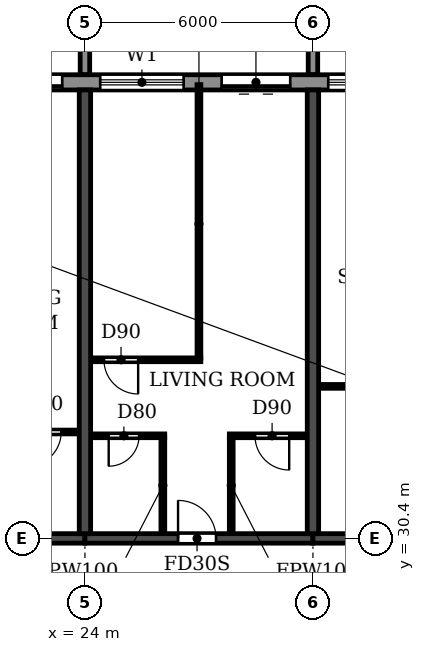
"""IFC4 building model, lengths in metres.
Left out: names, types, materials, properties, quantities, classifications, styles, units other than length and angle.
Written with IfcOpenShell. Run it as: python <this file> out.ifc"""

import sys

from ifc_helpers import new_model, si_unit, direction, frame, frame_2d, origin, place, context, subcontext, project, spatial, polyline, rectangle, outline, extrude, source, transform, mapped, element, fill, save


model = new_model("IFC4")
c1 = context("Model", 3, precision=1e-05, world=origin(), true_north=direction((0.0, 1.0)))
c2 = subcontext(c1, "Body", "Model", "MODEL_VIEW")
j1 = project(units=[si_unit("LENGTHUNIT", "METRE"), si_unit("PLANEANGLEUNIT", "RADIAN")], contexts=[c1])
p1 = place(None, origin())
s1 = spatial("IfcSite", under=j1, at=p1, CompositionType="ELEMENT")
p2 = place(p1, origin())
s2 = spatial("IfcBuilding", under=s1, at=p2, CompositionType="ELEMENT")
p3 = place(p2, frame((0.0, 0.0, 125.7)))
s3 = spatial("IfcBuildingStorey", under=s2, at=p3, CompositionType="ELEMENT", Elevation=125.7)
for number, where, z_axis, x_axis in (
    (1, (24.0, 30.525, 0.0), (0.0, 0.0, 1.0), (0.0, 1.0, 0.0)),
    (2, (30.0, 30.525, 0.0), (0.0, 0.0, 1.0), (0.0, 1.0, 0.0)),
):
    element("IfcWall", number, at=place(p3, frame(where, z_axis=z_axis, x_axis=x_axis)), inside=s3, PredefinedType="SHEAR", context=c2, shape_type="SweptSolid", body=[
        extrude(rectangle(XDim=11.675, YDim=0.3, at=frame_2d((5.837, 0.0))), origin(), (0.0, 0.0, 1.0), 3.07),
    ])
p4 = place(p3, frame((18.0, 30.4, 0.0), z_axis=(0.0, 0.0, 1.0), x_axis=(1.0, 0.0, 0.0)))
e3 = element("IfcWall", 3, at=p4, inside=s3, PredefinedType="SHEAR", context=c2, shape_type="SweptSolid", body=[
    extrude(rectangle(XDim=6.0, YDim=0.25, at=frame_2d((3.0, 0.0))), origin(), (0.0, 0.0, 1.0), 2.47),
])
p5 = place(p4, frame((2.45, 0.0, 0.0)))
e4 = element("IfcOpeningElement", 4, at=p5, cuts=e3, PredefinedType="OPENING", context=c2, shape_type="SweptSolid", body=[
    extrude(rectangle(XDim=1.0, YDim=2.1, at=frame_2d((0.5, 1.05))), frame((0.0, 0.135, 0.0), z_axis=(0.0, -1.0, 0.0), x_axis=(1.0, 0.0, 0.0)), (0.0, 0.0, 1.0), 0.27),
])
p6 = place(p3, frame((24.0, 30.4, 0.0), z_axis=(0.0, 0.0, 1.0), x_axis=(1.0, 0.0, 0.0)))
e5 = element("IfcWall", 5, at=p6, inside=s3, PredefinedType="SHEAR", context=c2, shape_type="SweptSolid", body=[
    extrude(rectangle(XDim=6.0, YDim=0.25, at=frame_2d((3.0, 0.0))), origin(), (0.0, 0.0, 1.0), 2.47),
])
p7 = place(p6, frame((2.45, 0.0, 0.0)))
e6 = element("IfcOpeningElement", 6, at=p7, cuts=e5, PredefinedType="OPENING", context=c2, shape_type="SweptSolid", body=[
    extrude(rectangle(XDim=1.0, YDim=2.1, at=frame_2d((0.5, 1.05))), frame((0.0, 0.135, 0.0), z_axis=(0.0, -1.0, 0.0), x_axis=(1.0, 0.0, 0.0)), (0.0, 0.0, 1.0), 0.27),
])
p8 = place(p3, frame((30.0, 30.4, 0.0), z_axis=(0.0, 0.0, 1.0), x_axis=(1.0, 0.0, 0.0)))
e7 = element("IfcWall", 7, at=p8, inside=s3, PredefinedType="SHEAR", context=c2, shape_type="SweptSolid", body=[
    extrude(rectangle(XDim=6.0, YDim=0.25, at=frame_2d((3.0, 0.0))), origin(), (0.0, 0.0, 1.0), 2.47),
])
p9 = place(p8, frame((2.45, 0.0, 0.0)))
e8 = element("IfcOpeningElement", 8, at=p9, cuts=e7, PredefinedType="OPENING", context=c2, shape_type="SweptSolid", body=[
    extrude(rectangle(XDim=1.0, YDim=2.1, at=frame_2d((0.5, 1.05))), frame((0.0, 0.135, 0.0), z_axis=(0.0, -1.0, 0.0), x_axis=(1.0, 0.0, 0.0)), (0.0, 0.0, 1.0), 0.27),
])
p10 = place(p3, frame((85.317, 42.4, 0.0), z_axis=(0.0, 0.0, 1.0), x_axis=(-1.0, 0.0, 0.0)))
e9 = element("IfcWall", 9, at=p10, inside=s3, PredefinedType="STANDARD", context=c2, shape_type="SweptSolid", body=[
    extrude(rectangle(XDim=68.634, YDim=0.4, at=frame_2d((34.317, 0.0))), origin(), (0.0, 0.0, 1.0), 3.07),
])
p11 = place(p10, frame((64.717, 0.0, 0.9)))
e10 = element("IfcOpeningElement", 10, at=p11, cuts=e9, PredefinedType="OPENING", context=c2, shape_type="SweptSolid", body=[
    extrude(rectangle(XDim=2.2, YDim=1.5, at=frame_2d((1.1, 0.75))), frame((0.0, 0.21, 0.0), z_axis=(0.0, -1.0, 0.0), x_axis=(1.0, 0.0, 0.0)), (0.0, 0.0, 1.0), 0.42),
])
p12 = place(p10, frame((61.917, 0.0, 0.0)))
e11 = element("IfcOpeningElement", 11, at=p12, cuts=e9, PredefinedType="OPENING", context=c2, shape_type="SweptSolid", body=[
    extrude(rectangle(XDim=1.8, YDim=2.4, at=frame_2d((0.9, 1.2))), frame((0.0, 0.21, 0.0), z_axis=(0.0, -1.0, 0.0), x_axis=(1.0, 0.0, 0.0)), (0.0, 0.0, 1.0), 0.42),
])
p13 = place(p10, frame((58.717, 0.0, 0.9)))
e12 = element("IfcOpeningElement", 12, at=p13, cuts=e9, PredefinedType="OPENING", context=c2, shape_type="SweptSolid", body=[
    extrude(rectangle(XDim=2.2, YDim=1.5, at=frame_2d((1.1, 0.75))), frame((0.0, 0.21, 0.0), z_axis=(0.0, -1.0, 0.0), x_axis=(1.0, 0.0, 0.0)), (0.0, 0.0, 1.0), 0.42),
])
p14 = place(p10, frame((55.917, 0.0, 0.0)))
e13 = element("IfcOpeningElement", 13, at=p14, cuts=e9, PredefinedType="OPENING", context=c2, shape_type="SweptSolid", body=[
    extrude(rectangle(XDim=1.8, YDim=2.4, at=frame_2d((0.9, 1.2))), frame((0.0, 0.21, 0.0), z_axis=(0.0, -1.0, 0.0), x_axis=(1.0, 0.0, 0.0)), (0.0, 0.0, 1.0), 0.42),
])
p15 = place(p10, frame((52.717, 0.0, 0.9)))
e14 = element("IfcOpeningElement", 14, at=p15, cuts=e9, PredefinedType="OPENING", context=c2, shape_type="SweptSolid", body=[
    extrude(rectangle(XDim=2.2, YDim=1.5, at=frame_2d((1.1, 0.75))), frame((0.0, 0.21, 0.0), z_axis=(0.0, -1.0, 0.0), x_axis=(1.0, 0.0, 0.0)), (0.0, 0.0, 1.0), 0.42),
])
p16 = place(p10, frame((49.917, 0.0, 0.0)))
e15 = element("IfcOpeningElement", 15, at=p16, cuts=e9, PredefinedType="OPENING", context=c2, shape_type="SweptSolid", body=[
    extrude(rectangle(XDim=1.8, YDim=2.4, at=frame_2d((0.9, 1.2))), frame((0.0, 0.21, 0.0), z_axis=(0.0, -1.0, 0.0), x_axis=(1.0, 0.0, 0.0)), (0.0, 0.0, 1.0), 0.42),
])
p17 = place(p10, frame((46.717, 0.0, 0.9)))
e16 = element("IfcOpeningElement", 16, at=p17, cuts=e9, PredefinedType="OPENING", context=c2, shape_type="SweptSolid", body=[
    extrude(rectangle(XDim=2.2, YDim=1.5, at=frame_2d((1.1, 0.75))), frame((0.0, 0.21, 0.0), z_axis=(0.0, -1.0, 0.0), x_axis=(1.0, 0.0, 0.0)), (0.0, 0.0, 1.0), 0.42),
])
p18 = place(p10, frame((43.917, 0.0, 0.0)))
e17 = element("IfcOpeningElement", 17, at=p18, cuts=e9, PredefinedType="OPENING", context=c2, shape_type="SweptSolid", body=[
    extrude(rectangle(XDim=1.8, YDim=2.4, at=frame_2d((0.9, 1.2))), frame((0.0, 0.21, 0.0), z_axis=(0.0, -1.0, 0.0), x_axis=(1.0, 0.0, 0.0)), (0.0, 0.0, 1.0), 0.42),
])
p19 = place(p10, frame((40.717, 0.0, 0.9)))
e18 = element("IfcOpeningElement", 18, at=p19, cuts=e9, PredefinedType="OPENING", context=c2, shape_type="SweptSolid", body=[
    extrude(rectangle(XDim=2.2, YDim=1.5, at=frame_2d((1.1, 0.75))), frame((0.0, 0.21, 0.0), z_axis=(0.0, -1.0, 0.0), x_axis=(1.0, 0.0, 0.0)), (0.0, 0.0, 1.0), 0.42),
])
p20 = place(p10, frame((37.717, 0.0, 0.9)))
e19 = element("IfcOpeningElement", 19, at=p20, cuts=e9, PredefinedType="OPENING", context=c2, shape_type="SweptSolid", body=[
    extrude(rectangle(XDim=2.2, YDim=1.5, at=frame_2d((1.1, 0.75))), frame((0.0, 0.21, 0.0), z_axis=(0.0, -1.0, 0.0), x_axis=(1.0, 0.0, 0.0)), (0.0, 0.0, 1.0), 0.42),
])
p21 = place(p10, frame((34.917, 0.0, 0.0)))
e20 = element("IfcOpeningElement", 20, at=p21, cuts=e9, PredefinedType="OPENING", context=c2, shape_type="SweptSolid", body=[
    extrude(rectangle(XDim=1.8, YDim=2.4, at=frame_2d((0.9, 1.2))), frame((0.0, 0.21, 0.0), z_axis=(0.0, -1.0, 0.0), x_axis=(1.0, 0.0, 0.0)), (0.0, 0.0, 1.0), 0.42),
])
p22 = place(p10, frame((31.717, 0.0, 0.9)))
e21 = element("IfcOpeningElement", 21, at=p22, cuts=e9, PredefinedType="OPENING", context=c2, shape_type="SweptSolid", body=[
    extrude(rectangle(XDim=2.2, YDim=1.5, at=frame_2d((1.1, 0.75))), frame((0.0, 0.21, 0.0), z_axis=(0.0, -1.0, 0.0), x_axis=(1.0, 0.0, 0.0)), (0.0, 0.0, 1.0), 0.42),
])
p23 = place(p10, frame((28.717, 0.0, 0.9)))
e22 = element("IfcOpeningElement", 22, at=p23, cuts=e9, PredefinedType="OPENING", context=c2, shape_type="SweptSolid", body=[
    extrude(rectangle(XDim=2.2, YDim=1.5, at=frame_2d((1.1, 0.75))), frame((0.0, 0.21, 0.0), z_axis=(0.0, -1.0, 0.0), x_axis=(1.0, 0.0, 0.0)), (0.0, 0.0, 1.0), 0.42),
])
p24 = place(p10, frame((25.717, 0.0, 0.9)))
e23 = element("IfcOpeningElement", 23, at=p24, cuts=e9, PredefinedType="OPENING", context=c2, shape_type="SweptSolid", body=[
    extrude(rectangle(XDim=2.2, YDim=1.5, at=frame_2d((1.1, 0.75))), frame((0.0, 0.21, 0.0), z_axis=(0.0, -1.0, 0.0), x_axis=(1.0, 0.0, 0.0)), (0.0, 0.0, 1.0), 0.42),
])
p25 = place(p10, frame((22.717, 0.0, 0.9)))
e24 = element("IfcOpeningElement", 24, at=p25, cuts=e9, PredefinedType="OPENING", context=c2, shape_type="SweptSolid", body=[
    extrude(rectangle(XDim=2.2, YDim=1.5, at=frame_2d((1.1, 0.75))), frame((0.0, 0.21, 0.0), z_axis=(0.0, -1.0, 0.0), x_axis=(1.0, 0.0, 0.0)), (0.0, 0.0, 1.0), 0.42),
])
p26 = place(p10, frame((19.917, 0.0, 0.0)))
e25 = element("IfcOpeningElement", 25, at=p26, cuts=e9, PredefinedType="OPENING", context=c2, shape_type="SweptSolid", body=[
    extrude(rectangle(XDim=1.8, YDim=2.4, at=frame_2d((0.9, 1.2))), frame((0.0, 0.21, 0.0), z_axis=(0.0, -1.0, 0.0), x_axis=(1.0, 0.0, 0.0)), (0.0, 0.0, 1.0), 0.42),
])
p27 = place(p10, frame((16.917, 0.0, 0.0)))
e26 = element("IfcOpeningElement", 26, at=p27, cuts=e9, PredefinedType="OPENING", context=c2, shape_type="SweptSolid", body=[
    extrude(rectangle(XDim=1.8, YDim=2.4, at=frame_2d((0.9, 1.2))), frame((0.0, 0.21, 0.0), z_axis=(0.0, -1.0, 0.0), x_axis=(1.0, 0.0, 0.0)), (0.0, 0.0, 1.0), 0.42),
])
p28 = place(p10, frame((13.717, 0.0, 0.9)))
e27 = element("IfcOpeningElement", 27, at=p28, cuts=e9, PredefinedType="OPENING", context=c2, shape_type="SweptSolid", body=[
    extrude(rectangle(XDim=2.2, YDim=1.5, at=frame_2d((1.1, 0.75))), frame((0.0, 0.21, 0.0), z_axis=(0.0, -1.0, 0.0), x_axis=(1.0, 0.0, 0.0)), (0.0, 0.0, 1.0), 0.42),
])
p29 = place(p10, frame((10.717, 0.0, 0.9)))
e28 = element("IfcOpeningElement", 28, at=p29, cuts=e9, PredefinedType="OPENING", context=c2, shape_type="SweptSolid", body=[
    extrude(rectangle(XDim=2.2, YDim=1.5, at=frame_2d((1.1, 0.75))), frame((0.0, 0.21, 0.0), z_axis=(0.0, -1.0, 0.0), x_axis=(1.0, 0.0, 0.0)), (0.0, 0.0, 1.0), 0.42),
])
p30 = place(p10, frame((7.717, 0.0, 0.9)))
e29 = element("IfcOpeningElement", 29, at=p30, cuts=e9, PredefinedType="OPENING", context=c2, shape_type="SweptSolid", body=[
    extrude(rectangle(XDim=2.2, YDim=1.5, at=frame_2d((1.1, 0.75))), frame((0.0, 0.21, 0.0), z_axis=(0.0, -1.0, 0.0), x_axis=(1.0, 0.0, 0.0)), (0.0, 0.0, 1.0), 0.42),
])
p31 = place(p10, frame((4.917, 0.0, 0.0)))
e30 = element("IfcOpeningElement", 30, at=p31, cuts=e9, PredefinedType="OPENING", context=c2, shape_type="SweptSolid", body=[
    extrude(rectangle(XDim=1.8, YDim=2.4, at=frame_2d((0.9, 1.2))), frame((0.0, 0.21, 0.0), z_axis=(0.0, -1.0, 0.0), x_axis=(1.0, 0.0, 0.0)), (0.0, 0.0, 1.0), 0.42),
])
p32 = place(p10, frame((1.717, 0.0, 0.9)))
e31 = element("IfcOpeningElement", 31, at=p32, cuts=e9, PredefinedType="OPENING", context=c2, shape_type="SweptSolid", body=[
    extrude(rectangle(XDim=2.2, YDim=1.5, at=frame_2d((1.1, 0.75))), frame((0.0, 0.21, 0.0), z_axis=(0.0, -1.0, 0.0), x_axis=(1.0, 0.0, 0.0)), (0.0, 0.0, 1.0), 0.42),
])
m1 = source(origin(), c2, "Body", "SweptSolid", [
    extrude(outline(polyline([(0.0, 0.0), (0.25, 0.0), (0.25, 3.1), (0.0, 3.1), (0.0, 0.0)])), origin(), (0.0, 0.0, 1.0), 3.1),
])
for number, where in (
    (32, (23.875, 42.6, 0.0)),
    (33, (29.875, 42.6, 0.0)),
):
    element("IfcWall", number, at=place(p3, frame(where)), inside=s3, PredefinedType="STANDARD", context=c2, shape_type="MappedRepresentation", body=[
        mapped(m1, transform((0.0, 0.0, 0.0))),
    ])
p33 = place(p3, frame((24.16, 33.1, 0.0), z_axis=(0.0, 0.0, 1.0), x_axis=(1.0, 0.0, 0.0)))
e34 = element("IfcWall", 34, at=p33, inside=s3, PredefinedType="PARTITIONING", context=c2, shape_type="SweptSolid", body=[
    extrude(rectangle(XDim=1.94, YDim=0.1, at=frame_2d((0.97, 0.0))), origin(), (0.0, 0.0, 1.0), 3.07),
])
p34 = place(p33, frame((0.465, 0.0, 0.0)))
e35 = element("IfcOpeningElement", 35, at=p34, cuts=e34, PredefinedType="OPENING", context=c2, shape_type="SweptSolid", body=[
    extrude(rectangle(XDim=0.8, YDim=2.1, at=frame_2d((0.4, 1.05))), frame((0.0, 0.06, 0.0), z_axis=(0.0, -1.0, 0.0), x_axis=(1.0, 0.0, 0.0)), (0.0, 0.0, 1.0), 0.12),
])
p35 = place(p3, frame((27.8, 33.1, 0.0), z_axis=(0.0, 0.0, 1.0), x_axis=(1.0, 0.0, 0.0)))
e36 = element("IfcWall", 36, at=p35, inside=s3, PredefinedType="PARTITIONING", context=c2, shape_type="SweptSolid", body=[
    extrude(rectangle(XDim=2.04, YDim=0.1, at=frame_2d((1.02, 0.0))), origin(), (0.0, 0.0, 1.0), 3.07),
])
p36 = place(p35, frame((0.675, 0.0, 0.0)))
e37 = element("IfcOpeningElement", 37, at=p36, cuts=e36, PredefinedType="OPENING", context=c2, shape_type="SweptSolid", body=[
    extrude(rectangle(XDim=0.9, YDim=2.1, at=frame_2d((0.45, 1.05))), frame((0.0, 0.06, 0.0), z_axis=(0.0, -1.0, 0.0), x_axis=(1.0, 0.0, 0.0)), (0.0, 0.0, 1.0), 0.12),
])
p37 = place(p3, frame((21.8, 33.2, 0.0), z_axis=(0.0, 0.0, 1.0), x_axis=(1.0, 0.0, 0.0)))
e38 = element("IfcWall", 38, at=p37, inside=s3, PredefinedType="PARTITIONING", context=c2, shape_type="SweptSolid", body=[
    extrude(rectangle(XDim=2.04, YDim=0.1, at=frame_2d((1.02, 0.0))), origin(), (0.0, 0.0, 1.0), 3.07),
])
p38 = place(p37, frame((0.675, 0.0, 0.0)))
e39 = element("IfcOpeningElement", 39, at=p38, cuts=e38, PredefinedType="OPENING", context=c2, shape_type="SweptSolid", body=[
    extrude(rectangle(XDim=0.9, YDim=2.1, at=frame_2d((0.45, 1.05))), frame((0.0, 0.06, 0.0), z_axis=(0.0, -1.0, 0.0), x_axis=(1.0, 0.0, 0.0)), (0.0, 0.0, 1.0), 0.12),
])
p39 = place(p3, frame((30.16, 34.4, 0.0), z_axis=(0.0, 0.0, 1.0), x_axis=(1.0, 0.0, 0.0)))
e40 = element("IfcWall", 40, at=p39, inside=s3, PredefinedType="PARTITIONING", context=c2, shape_type="SweptSolid", body=[
    extrude(rectangle(XDim=1.94, YDim=0.1, at=frame_2d((0.97, 0.0))), origin(), (0.0, 0.0, 1.0), 3.07),
])
p40 = place(p3, frame((24.16, 35.1, 0.0), z_axis=(0.0, 0.0, 1.0), x_axis=(1.0, 0.0, 0.0)))
e41 = element("IfcWall", 41, at=p40, inside=s3, PredefinedType="PARTITIONING", context=c2, shape_type="SweptSolid", body=[
    extrude(rectangle(XDim=2.89, YDim=0.1, at=frame_2d((1.445, 0.0))), origin(), (0.0, 0.0, 1.0), 3.07),
])
p41 = place(p40, frame((0.34, 0.0, 0.0)))
e42 = element("IfcOpeningElement", 42, at=p41, cuts=e41, PredefinedType="OPENING", context=c2, shape_type="SweptSolid", body=[
    extrude(rectangle(XDim=0.9, YDim=2.1, at=frame_2d((0.45, 1.05))), frame((0.0, 0.06, 0.0), z_axis=(0.0, -1.0, 0.0), x_axis=(1.0, 0.0, 0.0)), (0.0, 0.0, 1.0), 0.12),
])
p42 = place(p3, frame((26.05, 30.535, 0.0), z_axis=(0.0, 0.0, 1.0), x_axis=(0.0, 1.0, 0.0)))
e43 = element("IfcWall", 43, at=p42, inside=s3, PredefinedType="PARTITIONING", context=c2, shape_type="SweptSolid", body=[
    extrude(rectangle(XDim=2.515, YDim=0.1, at=frame_2d((1.258, 0.0))), origin(), (0.0, 0.0, 1.0), 3.07),
])
p43 = place(p3, frame((27.0, 35.15, 0.0), z_axis=(0.0, 0.0, 1.0), x_axis=(0.0, 1.0, 0.0)))
e44 = element("IfcWall", 44, at=p43, inside=s3, PredefinedType="PARTITIONING", context=c2, shape_type="SweptSolid", body=[
    extrude(rectangle(XDim=7.19, YDim=0.1, at=frame_2d((3.595, 0.0))), origin(), (0.0, 0.0, 1.0), 3.07),
])
p44 = place(p3, frame((27.85, 30.535, 0.0), z_axis=(0.0, 0.0, 1.0), x_axis=(0.0, 1.0, 0.0)))
e45 = element("IfcWall", 45, at=p44, inside=s3, PredefinedType="PARTITIONING", context=c2, shape_type="SweptSolid", body=[
    extrude(rectangle(XDim=2.515, YDim=0.1, at=frame_2d((1.258, 0.0))), origin(), (0.0, 0.0, 1.0), 3.07),
])
p45 = place(p12, origin())
e46 = element("IfcDoor", 46, at=p45, inside=s3, OperationType="DOUBLE_DOOR_SLIDING", PredefinedType="DOOR", context=c2, shape_type="SweptSolid", body=[
    extrude(rectangle(XDim=1.8, YDim=2.4, at=frame_2d((0.9, 1.2))), frame((0.0, 0.025, 0.0), z_axis=(0.0, -1.0, 0.0), x_axis=(1.0, 0.0, 0.0)), (0.0, 0.0, 1.0), 0.05),
])
fill(e11, e46)
p46 = place(p13, origin())
e47 = element("IfcWindow", 47, at=p46, inside=s3, PartitioningType="DOUBLE_PANEL_HORIZONTAL", PredefinedType="WINDOW", context=c2, shape_type="SweptSolid", body=[
    extrude(rectangle(XDim=2.2, YDim=1.5, at=frame_2d((1.1, 0.75))), frame((0.0, 0.03, 0.0), z_axis=(0.0, -1.0, 0.0), x_axis=(1.0, 0.0, 0.0)), (0.0, 0.0, 1.0), 0.06),
])
fill(e12, e47)
p47 = place(p14, origin())
e48 = element("IfcDoor", 48, at=p47, inside=s3, OperationType="DOUBLE_DOOR_SLIDING", PredefinedType="DOOR", context=c2, shape_type="SweptSolid", body=[
    extrude(rectangle(XDim=1.8, YDim=2.4, at=frame_2d((0.9, 1.2))), frame((0.0, 0.025, 0.0), z_axis=(0.0, -1.0, 0.0), x_axis=(1.0, 0.0, 0.0)), (0.0, 0.0, 1.0), 0.05),
])
fill(e13, e48)
p48 = place(p15, origin())
e49 = element("IfcWindow", 49, at=p48, inside=s3, PartitioningType="DOUBLE_PANEL_HORIZONTAL", PredefinedType="WINDOW", context=c2, shape_type="SweptSolid", body=[
    extrude(rectangle(XDim=2.2, YDim=1.5, at=frame_2d((1.1, 0.75))), frame((0.0, 0.03, 0.0), z_axis=(0.0, -1.0, 0.0), x_axis=(1.0, 0.0, 0.0)), (0.0, 0.0, 1.0), 0.06),
])
fill(e14, e49)
p49 = place(p38, frame((0.9, 0.0, 0.0), z_axis=(0.0, 0.0, 1.0), x_axis=(-1.0, 0.0, 0.0)))
e50 = element("IfcDoor", 50, at=p49, inside=s3, OperationType="SINGLE_SWING_RIGHT", PredefinedType="DOOR", context=c2, shape_type="SweptSolid", body=[
    extrude(rectangle(XDim=0.9, YDim=2.1, at=frame_2d((0.45, 1.05))), frame((0.0, 0.025, 0.0), z_axis=(0.0, -1.0, 0.0), x_axis=(1.0, 0.0, 0.0)), (0.0, 0.0, 1.0), 0.05),
])
fill(e39, e50)
p50 = place(p41, frame((0.9, 0.0, 0.0), z_axis=(0.0, 0.0, 1.0), x_axis=(-1.0, 0.0, 0.0)))
e51 = element("IfcDoor", 51, at=p50, inside=s3, OperationType="SINGLE_SWING_LEFT", PredefinedType="DOOR", context=c2, shape_type="SweptSolid", body=[
    extrude(rectangle(XDim=0.9, YDim=2.1, at=frame_2d((0.45, 1.05))), frame((0.0, 0.025, 0.0), z_axis=(0.0, -1.0, 0.0), x_axis=(1.0, 0.0, 0.0)), (0.0, 0.0, 1.0), 0.05),
])
fill(e42, e51)
p51 = place(p34, frame((0.8, 0.0, 0.0), z_axis=(0.0, 0.0, 1.0), x_axis=(-1.0, 0.0, 0.0)))
e52 = element("IfcDoor", 52, at=p51, inside=s3, OperationType="SINGLE_SWING_RIGHT", PredefinedType="DOOR", context=c2, shape_type="SweptSolid", body=[
    extrude(rectangle(XDim=0.8, YDim=2.1, at=frame_2d((0.4, 1.05))), frame((0.0, 0.025, 0.0), z_axis=(0.0, -1.0, 0.0), x_axis=(1.0, 0.0, 0.0)), (0.0, 0.0, 1.0), 0.05),
])
fill(e35, e52)
p52 = place(p7, origin())
e53 = element("IfcDoor", 53, at=p52, inside=s3, OperationType="SINGLE_SWING_LEFT", PredefinedType="DOOR", context=c2, shape_type="SweptSolid", body=[
    extrude(rectangle(XDim=1.0, YDim=2.1, at=frame_2d((0.5, 1.05))), frame((0.0, 0.025, 0.0), z_axis=(0.0, -1.0, 0.0), x_axis=(1.0, 0.0, 0.0)), (0.0, 0.0, 1.0), 0.05),
])
fill(e6, e53)
p53 = place(p36, frame((0.9, 0.0, 0.0), z_axis=(0.0, 0.0, 1.0), x_axis=(-1.0, 0.0, 0.0)))
e54 = element("IfcDoor", 54, at=p53, inside=s3, OperationType="SINGLE_SWING_LEFT", PredefinedType="DOOR", context=c2, shape_type="SweptSolid", body=[
    extrude(rectangle(XDim=0.9, YDim=2.1, at=frame_2d((0.45, 1.05))), frame((0.0, 0.025, 0.0), z_axis=(0.0, -1.0, 0.0), x_axis=(1.0, 0.0, 0.0)), (0.0, 0.0, 1.0), 0.05),
])
fill(e37, e54)
save(model, sys.argv[1])
